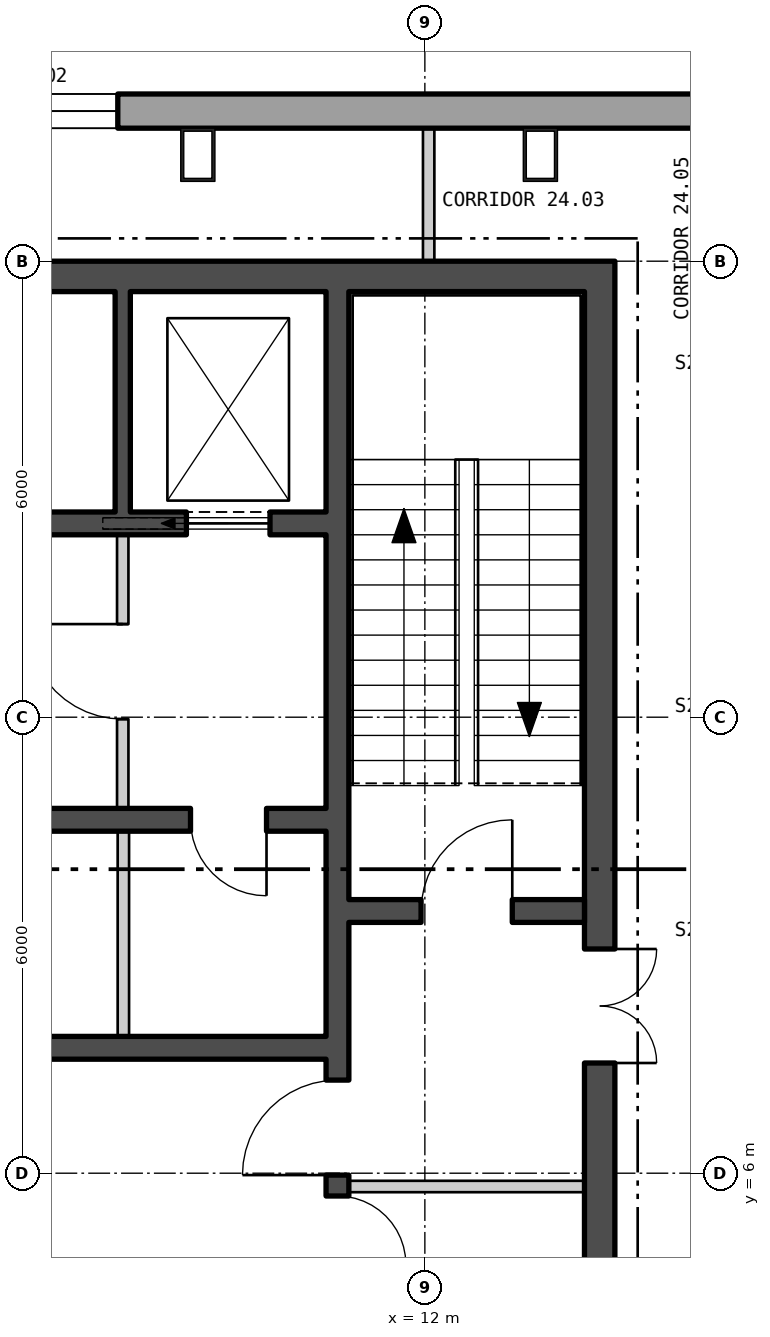
"""IFC4 building model, lengths in metres.
Left out: names, types, materials, properties, quantities, classifications, styles, units other than length and angle.
Written with IfcOpenShell. Run it as: python <this file> out.ifc"""

import sys

from ifc_helpers import new_model, si_unit, direction, frame, frame_2d, origin, origin_2d, place, context, subcontext, project, spatial, polyline, rectangle, hollow_rectangle, outline, extrude, element, fill, save


model = new_model("IFC4")
c1 = context("Model", 3, precision=1e-05, world=origin(), true_north=direction((0.0, 1.0)))
c2 = subcontext(c1, "Body", "Model", "MODEL_VIEW")
j1 = project(units=[si_unit("LENGTHUNIT", "METRE"), si_unit("PLANEANGLEUNIT", "RADIAN")], contexts=[c1])
p1 = place(None, origin())
s1 = spatial("IfcSite", under=j1, at=p1, CompositionType="ELEMENT")
p2 = place(p1, origin())
s2 = spatial("IfcBuilding", under=s1, at=p2, CompositionType="ELEMENT")
p3 = place(p2, frame((0.0, 0.0, 312.6)))
s3 = spatial("IfcBuildingStorey", under=s2, at=p3, CompositionType="ELEMENT", Elevation=312.6)
for number, where, z_axis, x_axis in (
    (1, (13.52, 19.4, 0.0), (0.0, 0.0, 1.0), (-1.0, 0.0, 0.0)),
    (2, (9.013, 19.4, 0.0), (0.0, 0.0, 1.0), (-1.0, 0.0, 0.0)),
):
    element("IfcColumn", number, at=place(p3, frame(where, z_axis=z_axis, x_axis=x_axis)), inside=s3, PredefinedType="COLUMN", context=c2, shape_type="SweptSolid", body=[
        extrude(hollow_rectangle(XDim=0.45, YDim=0.7, WallThickness=0.04, at=origin_2d()), origin(), (0.0, 0.0, 1.0), 4.2),
    ])
p4 = place(p3, frame((22.865, 19.975, -0.4), z_axis=(0.0, 0.0, 1.0), x_axis=(-1.0, 0.0, 0.0)))
e3 = element("IfcWall", 3, at=p4, inside=s3, PredefinedType="SOLIDWALL", context=c2, shape_type="SweptSolid", body=[
    extrude(outline(polyline([(-0.13, -0.225), (45.86, -0.225), (45.6, 0.225), (0.13, 0.225), (-0.13, -0.225)])), origin(), (0.0, 0.0, 1.0), 4.2),
])
p5 = place(p4, frame((1.424, 0.0, 1.3)))
e4 = element("IfcOpeningElement", 4, at=p5, cuts=e3, PredefinedType="OPENING", context=c2, shape_type="SweptSolid", body=[
    extrude(rectangle(XDim=2.4, YDim=2.3, at=frame_2d((1.2, 1.15))), frame((0.0, 0.235, 0.0), z_axis=(0.0, -1.0, 0.0), x_axis=(1.0, 0.0, 0.0)), (0.0, 0.0, 1.0), 0.47),
])
p6 = place(p4, frame((14.905, 0.0, 1.3)))
e5 = element("IfcOpeningElement", 5, at=p6, cuts=e3, PredefinedType="OPENING", context=c2, shape_type="SweptSolid", body=[
    extrude(rectangle(XDim=2.4, YDim=2.3, at=frame_2d((1.2, 1.15))), frame((0.0, 0.235, 0.0), z_axis=(0.0, -1.0, 0.0), x_axis=(1.0, 0.0, 0.0)), (0.0, 0.0, 1.0), 0.47),
])
p7 = place(p4, frame((19.412, 0.0, 1.3)))
e6 = element("IfcOpeningElement", 6, at=p7, cuts=e3, PredefinedType="OPENING", context=c2, shape_type="SweptSolid", body=[
    extrude(rectangle(XDim=2.4, YDim=2.3, at=frame_2d((1.2, 1.15))), frame((0.0, 0.235, 0.0), z_axis=(0.0, -1.0, 0.0), x_axis=(1.0, 0.0, 0.0)), (0.0, 0.0, 1.0), 0.47),
])
p8 = place(p4, frame((23.918, 0.0, 1.3)))
e7 = element("IfcOpeningElement", 7, at=p8, cuts=e3, PredefinedType="OPENING", context=c2, shape_type="SweptSolid", body=[
    extrude(rectangle(XDim=2.4, YDim=2.3, at=frame_2d((1.2, 1.15))), frame((0.0, 0.235, 0.0), z_axis=(0.0, -1.0, 0.0), x_axis=(1.0, 0.0, 0.0)), (0.0, 0.0, 1.0), 0.47),
])
p9 = place(p4, frame((28.425, 0.0, 1.3)))
e8 = element("IfcOpeningElement", 8, at=p9, cuts=e3, PredefinedType="OPENING", context=c2, shape_type="SweptSolid", body=[
    extrude(rectangle(XDim=2.4, YDim=2.3, at=frame_2d((1.2, 1.15))), frame((0.0, 0.235, 0.0), z_axis=(0.0, -1.0, 0.0), x_axis=(1.0, 0.0, 0.0)), (0.0, 0.0, 1.0), 0.47),
])
p10 = place(p4, frame((32.932, 0.0, 1.3)))
e9 = element("IfcOpeningElement", 9, at=p10, cuts=e3, PredefinedType="OPENING", context=c2, shape_type="SweptSolid", body=[
    extrude(rectangle(XDim=2.4, YDim=2.3, at=frame_2d((1.2, 1.15))), frame((0.0, 0.235, 0.0), z_axis=(0.0, -1.0, 0.0), x_axis=(1.0, 0.0, 0.0)), (0.0, 0.0, 1.0), 0.47),
])
p11 = place(p4, frame((41.907, 0.0, 1.3)))
e10 = element("IfcOpeningElement", 10, at=p11, cuts=e3, PredefinedType="OPENING", context=c2, shape_type="SweptSolid", body=[
    extrude(rectangle(XDim=2.4, YDim=2.3, at=frame_2d((1.2, 1.15))), frame((0.0, 0.235, 0.0), z_axis=(0.0, -1.0, 0.0), x_axis=(1.0, 0.0, 0.0)), (0.0, 0.0, 1.0), 0.47),
])
p12 = place(p3, frame((2.12, -23.301, -0.18), z_axis=(0.0, 0.0, 1.0), x_axis=(0.500000141277, 0.866025322218, 0.0)))
e11 = element("IfcWall", 11, at=p12, inside=s3, PredefinedType="SOLIDWALL", context=c2, shape_type="SweptSolid", body=[
    extrude(outline(polyline([(-0.13, -0.225), (45.86, -0.225), (45.6, 0.225), (0.13, 0.225), (-0.13, -0.225)])), origin(), (0.0, 0.0, 1.0), 3.98),
])
p13 = place(p12, frame((1.424, 0.0, 1.08)))
e12 = element("IfcOpeningElement", 12, at=p13, cuts=e11, PredefinedType="OPENING", context=c2, shape_type="SweptSolid", body=[
    extrude(rectangle(XDim=2.4, YDim=2.3, at=frame_2d((1.2, 1.15))), frame((0.0, 0.235, 0.0), z_axis=(0.0, -1.0, 0.0), x_axis=(1.0, 0.0, 0.0)), (0.0, 0.0, 1.0), 0.47),
])
p14 = place(p12, frame((5.892, 0.0, 1.08)))
e13 = element("IfcOpeningElement", 13, at=p14, cuts=e11, PredefinedType="OPENING", context=c2, shape_type="SweptSolid", body=[
    extrude(rectangle(XDim=2.4, YDim=2.3, at=frame_2d((1.2, 1.15))), frame((0.0, 0.235, 0.0), z_axis=(0.0, -1.0, 0.0), x_axis=(1.0, 0.0, 0.0)), (0.0, 0.0, 1.0), 0.47),
])
p15 = place(p12, frame((14.905, 0.0, 1.08)))
e14 = element("IfcOpeningElement", 14, at=p15, cuts=e11, PredefinedType="OPENING", context=c2, shape_type="SweptSolid", body=[
    extrude(rectangle(XDim=2.4, YDim=2.3, at=frame_2d((1.2, 1.15))), frame((0.0, 0.235, 0.0), z_axis=(0.0, -1.0, 0.0), x_axis=(1.0, 0.0, 0.0)), (0.0, 0.0, 1.0), 0.47),
])
p16 = place(p12, frame((19.412, 0.0, 1.08)))
e15 = element("IfcOpeningElement", 15, at=p16, cuts=e11, PredefinedType="OPENING", context=c2, shape_type="SweptSolid", body=[
    extrude(rectangle(XDim=2.4, YDim=2.3, at=frame_2d((1.2, 1.15))), frame((0.0, 0.235, 0.0), z_axis=(0.0, -1.0, 0.0), x_axis=(1.0, 0.0, 0.0)), (0.0, 0.0, 1.0), 0.47),
])
p17 = place(p12, frame((23.918, 0.0, 1.08)))
e16 = element("IfcOpeningElement", 16, at=p17, cuts=e11, PredefinedType="OPENING", context=c2, shape_type="SweptSolid", body=[
    extrude(rectangle(XDim=2.4, YDim=2.3, at=frame_2d((1.2, 1.15))), frame((0.0, 0.235, 0.0), z_axis=(0.0, -1.0, 0.0), x_axis=(1.0, 0.0, 0.0)), (0.0, 0.0, 1.0), 0.47),
])
p18 = place(p12, frame((28.425, 0.0, 1.08)))
e17 = element("IfcOpeningElement", 17, at=p18, cuts=e11, PredefinedType="OPENING", context=c2, shape_type="SweptSolid", body=[
    extrude(rectangle(XDim=2.4, YDim=2.3, at=frame_2d((1.2, 1.15))), frame((0.0, 0.235, 0.0), z_axis=(0.0, -1.0, 0.0), x_axis=(1.0, 0.0, 0.0)), (0.0, 0.0, 1.0), 0.47),
])
p19 = place(p12, frame((37.438, 0.0, 1.08)))
e18 = element("IfcOpeningElement", 18, at=p19, cuts=e11, PredefinedType="OPENING", context=c2, shape_type="SweptSolid", body=[
    extrude(rectangle(XDim=2.4, YDim=2.3, at=frame_2d((1.2, 1.15))), frame((0.0, 0.235, 0.0), z_axis=(0.0, -1.0, 0.0), x_axis=(1.0, 0.0, 0.0)), (0.0, 0.0, 1.0), 0.47),
])
p20 = place(p12, frame((41.907, 0.0, 1.08)))
e19 = element("IfcOpeningElement", 19, at=p20, cuts=e11, PredefinedType="OPENING", context=c2, shape_type="SweptSolid", body=[
    extrude(rectangle(XDim=2.4, YDim=2.3, at=frame_2d((1.2, 1.15))), frame((0.0, 0.235, 0.0), z_axis=(0.0, -1.0, 0.0), x_axis=(1.0, 0.0, 0.0)), (0.0, 0.0, 1.0), 0.47),
])
p21 = place(p3, frame((-14.5, 17.8, 0.0), z_axis=(0.0, 0.0, 1.0), x_axis=(1.0, 0.0, 0.0)))
e20 = element("IfcWall", 20, at=p21, inside=s3, PredefinedType="SHEAR", context=c2, shape_type="SweptSolid", body=[
    extrude(rectangle(XDim=29.0, YDim=0.4, at=frame_2d((14.5, 0.0))), origin(), (0.0, 0.0, 1.0), 4.0),
])
p22 = place(p3, frame((14.3, 4.4, 0.0), z_axis=(0.0, 0.0, 1.0), x_axis=(0.0, 1.0, 0.0)))
e21 = element("IfcWall", 21, at=p22, inside=s3, PredefinedType="SHEAR", context=c2, shape_type="SweptSolid", body=[
    extrude(rectangle(XDim=13.2, YDim=0.4, at=frame_2d((6.6, 0.0))), origin(), (0.0, 0.0, 1.0), 4.0),
])
p23 = place(p22, frame((3.05, 0.0, 0.0)))
e22 = element("IfcOpeningElement", 22, at=p23, cuts=e21, PredefinedType="OPENING", context=c2, shape_type="SweptSolid", body=[
    extrude(rectangle(XDim=1.5, YDim=2.1, at=frame_2d((0.75, 1.05))), frame((0.0, 0.21, 0.0), z_axis=(0.0, -1.0, 0.0), x_axis=(1.0, 0.0, 0.0)), (0.0, 0.0, 1.0), 0.42),
])
p24 = place(p3, frame((10.85, 4.4, 0.0), z_axis=(0.0, 0.0, 1.0), x_axis=(0.0, 1.0, 0.0)))
e23 = element("IfcWall", 23, at=p24, inside=s3, PredefinedType="SHEAR", context=c2, shape_type="SweptSolid", body=[
    extrude(rectangle(XDim=13.2, YDim=0.3, at=frame_2d((6.6, 0.0))), origin(), (0.0, 0.0, 1.0), 4.0),
])
p25 = place(p24, frame((1.575, 0.0, 0.0)))
e24 = element("IfcOpeningElement", 24, at=p25, cuts=e23, PredefinedType="OPENING", context=c2, shape_type="SweptSolid", body=[
    extrude(rectangle(XDim=1.25, YDim=2.1, at=frame_2d((0.625, 1.05))), frame((0.0, 0.16, 0.0), z_axis=(0.0, -1.0, 0.0), x_axis=(1.0, 0.0, 0.0)), (0.0, 0.0, 1.0), 0.32),
])
p26 = place(p24, frame((0.4, 0.0, 0.0)))
e25 = element("IfcOpeningElement", 25, at=p26, cuts=e23, PredefinedType="OPENING", context=c2, shape_type="SweptSolid", body=[
    extrude(rectangle(XDim=0.9, YDim=2.1, at=frame_2d((0.45, 1.05))), frame((0.0, 0.16, 0.0), z_axis=(0.0, -1.0, 0.0), x_axis=(1.0, 0.0, 0.0)), (0.0, 0.0, 1.0), 0.32),
])
p27 = place(p3, frame((11.0, 9.45, 0.0), z_axis=(0.0, 0.0, 1.0), x_axis=(1.0, 0.0, 0.0)))
e26 = element("IfcWall", 26, at=p27, inside=s3, PredefinedType="SHEAR", context=c2, shape_type="SweptSolid", body=[
    extrude(rectangle(XDim=3.1, YDim=0.3, at=frame_2d((1.55, 0.0))), origin(), (0.0, 0.0, 1.0), 4.0),
])
p28 = place(p27, frame((0.95, 0.0, 0.0)))
e27 = element("IfcOpeningElement", 27, at=p28, cuts=e26, PredefinedType="OPENING", context=c2, shape_type="SweptSolid", body=[
    extrude(rectangle(XDim=1.2, YDim=2.1, at=frame_2d((0.6, 1.05))), frame((0.0, 0.16, 0.0), z_axis=(0.0, -1.0, 0.0), x_axis=(1.0, 0.0, 0.0)), (0.0, 0.0, 1.0), 0.32),
])
p29 = place(p3, frame((-10.7, 14.55, 0.0), z_axis=(0.0, 0.0, 1.0), x_axis=(1.0, 0.0, 0.0)))
e28 = element("IfcWall", 28, at=p29, inside=s3, PredefinedType="SHEAR", context=c2, shape_type="SweptSolid", body=[
    extrude(rectangle(XDim=21.4, YDim=0.3, at=frame_2d((10.7, 0.0))), origin(), (0.0, 0.0, 1.0), 4.0),
])
p30 = place(p29, frame((0.738, 0.0, 0.0)))
e29 = element("IfcOpeningElement", 29, at=p30, cuts=e28, PredefinedType="OPENING", context=c2, shape_type="SweptSolid", body=[
    extrude(rectangle(XDim=1.1, YDim=2.1, at=frame_2d((0.55, 1.05))), frame((0.0, 0.16, 0.0), z_axis=(0.0, -1.0, 0.0), x_axis=(1.0, 0.0, 0.0)), (0.0, 0.0, 1.0), 0.32),
])
p31 = place(p29, frame((3.462, 0.0, 0.0)))
e30 = element("IfcOpeningElement", 30, at=p31, cuts=e28, PredefinedType="OPENING", context=c2, shape_type="SweptSolid", body=[
    extrude(rectangle(XDim=1.1, YDim=2.1, at=frame_2d((0.55, 1.05))), frame((0.0, 0.16, 0.0), z_axis=(0.0, -1.0, 0.0), x_axis=(1.0, 0.0, 0.0)), (0.0, 0.0, 1.0), 0.32),
])
p32 = place(p29, frame((6.138, 0.0, 0.0)))
e31 = element("IfcOpeningElement", 31, at=p32, cuts=e28, PredefinedType="OPENING", context=c2, shape_type="SweptSolid", body=[
    extrude(rectangle(XDim=1.1, YDim=2.1, at=frame_2d((0.55, 1.05))), frame((0.0, 0.16, 0.0), z_axis=(0.0, -1.0, 0.0), x_axis=(1.0, 0.0, 0.0)), (0.0, 0.0, 1.0), 0.32),
])
p33 = place(p29, frame((8.812, 0.0, 0.0)))
e32 = element("IfcOpeningElement", 32, at=p33, cuts=e28, PredefinedType="OPENING", context=c2, shape_type="SweptSolid", body=[
    extrude(rectangle(XDim=1.1, YDim=2.1, at=frame_2d((0.55, 1.05))), frame((0.0, 0.16, 0.0), z_axis=(0.0, -1.0, 0.0), x_axis=(1.0, 0.0, 0.0)), (0.0, 0.0, 1.0), 0.32),
])
p34 = place(p29, frame((19.562, 0.0, 0.0)))
e33 = element("IfcOpeningElement", 33, at=p34, cuts=e28, PredefinedType="OPENING", context=c2, shape_type="SweptSolid", body=[
    extrude(rectangle(XDim=1.1, YDim=2.1, at=frame_2d((0.55, 1.05))), frame((0.0, 0.16, 0.0), z_axis=(0.0, -1.0, 0.0), x_axis=(1.0, 0.0, 0.0)), (0.0, 0.0, 1.0), 0.32),
])
p35 = place(p29, frame((14.213, 0.0, 0.0)))
e34 = element("IfcOpeningElement", 34, at=p35, cuts=e28, PredefinedType="OPENING", context=c2, shape_type="SweptSolid", body=[
    extrude(rectangle(XDim=1.0, YDim=2.1, at=frame_2d((0.5, 1.05))), frame((0.0, 0.16, 0.0), z_axis=(0.0, -1.0, 0.0), x_axis=(1.0, 0.0, 0.0)), (0.0, 0.0, 1.0), 0.32),
])
p36 = place(p3, frame((2.6, 10.65, 0.0), z_axis=(0.0, 0.0, 1.0), x_axis=(1.0, 0.0, 0.0)))
e35 = element("IfcWall", 35, at=p36, inside=s3, PredefinedType="SHEAR", context=c2, shape_type="SweptSolid", body=[
    extrude(rectangle(XDim=8.1, YDim=0.3, at=frame_2d((4.05, 0.0))), origin(), (0.0, 0.0, 1.0), 4.0),
])
p37 = place(p36, frame((2.267, 0.0, 0.0)))
e36 = element("IfcOpeningElement", 36, at=p37, cuts=e35, PredefinedType="OPENING", context=c2, shape_type="SweptSolid", body=[
    extrude(rectangle(XDim=1.0, YDim=2.1, at=frame_2d((0.5, 1.05))), frame((0.0, 0.16, 0.0), z_axis=(0.0, -1.0, 0.0), x_axis=(1.0, 0.0, 0.0)), (0.0, 0.0, 1.0), 0.32),
])
p38 = place(p36, frame((6.317, 0.0, 0.0)))
e37 = element("IfcOpeningElement", 37, at=p38, cuts=e35, PredefinedType="OPENING", context=c2, shape_type="SweptSolid", body=[
    extrude(rectangle(XDim=1.0, YDim=2.1, at=frame_2d((0.5, 1.05))), frame((0.0, 0.16, 0.0), z_axis=(0.0, -1.0, 0.0), x_axis=(1.0, 0.0, 0.0)), (0.0, 0.0, 1.0), 0.32),
])
p39 = place(p3, frame((2.6, 7.65, 0.0), z_axis=(0.0, 0.0, 1.0), x_axis=(1.0, 0.0, 0.0)))
e38 = element("IfcWall", 38, at=p39, inside=s3, PredefinedType="SHEAR", context=c2, shape_type="SweptSolid", body=[
    extrude(rectangle(XDim=8.1, YDim=0.3, at=frame_2d((4.05, 0.0))), origin(), (0.0, 0.0, 1.0), 4.0),
])
p40 = place(p3, frame((8.025, 14.7, 0.0), z_axis=(0.0, 0.0, 1.0), x_axis=(0.0, 1.0, 0.0)))
e39 = element("IfcWall", 39, at=p40, inside=s3, PredefinedType="SHEAR", context=c2, shape_type="SweptSolid", body=[
    extrude(rectangle(XDim=2.9, YDim=0.2, at=frame_2d((1.45, 0.0))), origin(), (0.0, 0.0, 1.0), 4.0),
])
p41 = place(p3, frame((8.033, 7.8, 0.0), z_axis=(0.0, 0.0, 1.0), x_axis=(0.0, 1.0, 0.0)))
e40 = element("IfcWall", 40, at=p41, inside=s3, PredefinedType="PARTITIONING", context=c2, shape_type="SweptSolid", body=[
    extrude(rectangle(XDim=2.7, YDim=0.15, at=frame_2d((1.35, 0.0))), origin(), (0.0, 0.0, 1.0), 4.0),
])
p42 = place(p3, frame((8.025, 10.8, 0.0), z_axis=(0.0, 0.0, 1.0), x_axis=(0.0, 1.0, 0.0)))
e41 = element("IfcWall", 41, at=p42, inside=s3, PredefinedType="PARTITIONING", context=c2, shape_type="SweptSolid", body=[
    extrude(rectangle(XDim=3.6, YDim=0.15, at=frame_2d((1.8, 0.0))), origin(), (0.0, 0.0, 1.0), 4.0),
])
p43 = place(p42, frame((1.175, 0.0, 0.0)))
e42 = element("IfcOpeningElement", 42, at=p43, cuts=e41, PredefinedType="OPENING", context=c2, shape_type="SweptSolid", body=[
    extrude(rectangle(XDim=1.25, YDim=2.1, at=frame_2d((0.625, 1.05))), frame((0.0, 0.085, 0.0), z_axis=(0.0, -1.0, 0.0), x_axis=(1.0, 0.0, 0.0)), (0.0, 0.0, 1.0), 0.17),
])
p44 = place(p3, frame((11.0, 5.825, 0.0), z_axis=(0.0, 0.0, 1.0), x_axis=(1.0, 0.0, 0.0)))
e43 = element("IfcWall", 43, at=p44, inside=s3, PredefinedType="PARTITIONING", context=c2, shape_type="SweptSolid", body=[
    extrude(rectangle(XDim=3.1, YDim=0.15, at=frame_2d((1.55, 0.0))), origin(), (0.0, 0.0, 1.0), 4.0),
])
p45 = place(p3, frame((12.05, 18.0, 0.0), z_axis=(0.0, 0.0, 1.0), x_axis=(0.0, 1.0, 0.0)))
e44 = element("IfcWall", 44, at=p45, inside=s3, PredefinedType="PARTITIONING", context=c2, shape_type="SweptSolid", body=[
    extrude(rectangle(XDim=1.75, YDim=0.15, at=frame_2d((0.875, 0.0))), origin(), (0.0, 0.0, 1.0), 4.0),
])
p46 = place(p6, origin())
e45 = element("IfcWindow", 45, at=p46, inside=s3, PartitioningType="SINGLE_PANEL", PredefinedType="WINDOW", context=c2, shape_type="SweptSolid", body=[
    extrude(rectangle(XDim=2.4, YDim=2.3, at=frame_2d((1.2, 1.15))), frame((0.0, 0.105, 0.0), z_axis=(0.0, -1.0, 0.0), x_axis=(1.0, 0.0, 0.0)), (0.0, 0.0, 1.0), 0.06),
])
fill(e5, e45)
p47 = place(p34, origin())
e46 = element("IfcDoor", 46, at=p47, inside=s3, OperationType="SLIDING_TO_LEFT", PredefinedType="DOOR", context=c2, shape_type="SweptSolid", body=[
    extrude(rectangle(XDim=1.1, YDim=2.1, at=frame_2d((0.55, 1.05))), frame((0.0, 0.025, 0.0), z_axis=(0.0, -1.0, 0.0), x_axis=(1.0, 0.0, 0.0)), (0.0, 0.0, 1.0), 0.05),
])
fill(e33, e46)
p48 = place(p38, origin())
e47 = element("IfcDoor", 47, at=p48, inside=s3, OperationType="SINGLE_SWING_RIGHT", PredefinedType="DOOR", context=c2, shape_type="SweptSolid", body=[
    extrude(rectangle(XDim=1.0, YDim=2.1, at=frame_2d((0.5, 1.05))), frame((0.0, 0.025, 0.0), z_axis=(0.0, -1.0, 0.0), x_axis=(1.0, 0.0, 0.0)), (0.0, 0.0, 1.0), 0.05),
])
fill(e37, e47)
p49 = place(p43, origin())
e48 = element("IfcDoor", 48, at=p49, inside=s3, OperationType="SINGLE_SWING_LEFT", PredefinedType="DOOR", context=c2, shape_type="SweptSolid", body=[
    extrude(rectangle(XDim=1.25, YDim=2.1, at=frame_2d((0.625, 1.05))), frame((0.0, 0.025, 0.0), z_axis=(0.0, -1.0, 0.0), x_axis=(1.0, 0.0, 0.0)), (0.0, 0.0, 1.0), 0.05),
])
fill(e42, e48)
p50 = place(p28, origin())
e49 = element("IfcDoor", 49, at=p50, inside=s3, OperationType="SINGLE_SWING_LEFT", PredefinedType="DOOR", context=c2, shape_type="SweptSolid", body=[
    extrude(rectangle(XDim=1.2, YDim=2.1, at=frame_2d((0.6, 1.05))), frame((0.0, 0.025, 0.0), z_axis=(0.0, -1.0, 0.0), x_axis=(1.0, 0.0, 0.0)), (0.0, 0.0, 1.0), 0.05),
])
fill(e27, e49)
p51 = place(p25, origin())
e50 = element("IfcDoor", 50, at=p51, inside=s3, OperationType="SINGLE_SWING_RIGHT", PredefinedType="DOOR", context=c2, shape_type="SweptSolid", body=[
    extrude(rectangle(XDim=1.25, YDim=2.1, at=frame_2d((0.625, 1.05))), frame((0.0, 0.025, 0.0), z_axis=(0.0, -1.0, 0.0), x_axis=(1.0, 0.0, 0.0)), (0.0, 0.0, 1.0), 0.05),
])
fill(e24, e50)
p52 = place(p23, origin())
e51 = element("IfcDoor", 51, at=p52, inside=s3, OperationType="DOUBLE_DOOR_SINGLE_SWING", PredefinedType="DOOR", context=c2, shape_type="SweptSolid", body=[
    extrude(rectangle(XDim=1.5, YDim=2.1, at=frame_2d((0.75, 1.05))), frame((0.0, 0.025, 0.0), z_axis=(0.0, -1.0, 0.0), x_axis=(1.0, 0.0, 0.0)), (0.0, 0.0, 1.0), 0.05),
])
fill(e22, e51)
p53 = place(p26, origin())
e52 = element("IfcDoor", 52, at=p53, inside=s3, OperationType="SINGLE_SWING_LEFT", PredefinedType="DOOR", context=c2, shape_type="SweptSolid", body=[
    extrude(rectangle(XDim=0.9, YDim=2.1, at=frame_2d((0.45, 1.05))), frame((0.0, 0.025, 0.0), z_axis=(0.0, -1.0, 0.0), x_axis=(1.0, 0.0, 0.0)), (0.0, 0.0, 1.0), 0.05),
])
fill(e25, e52)
save(model, sys.argv[1])
